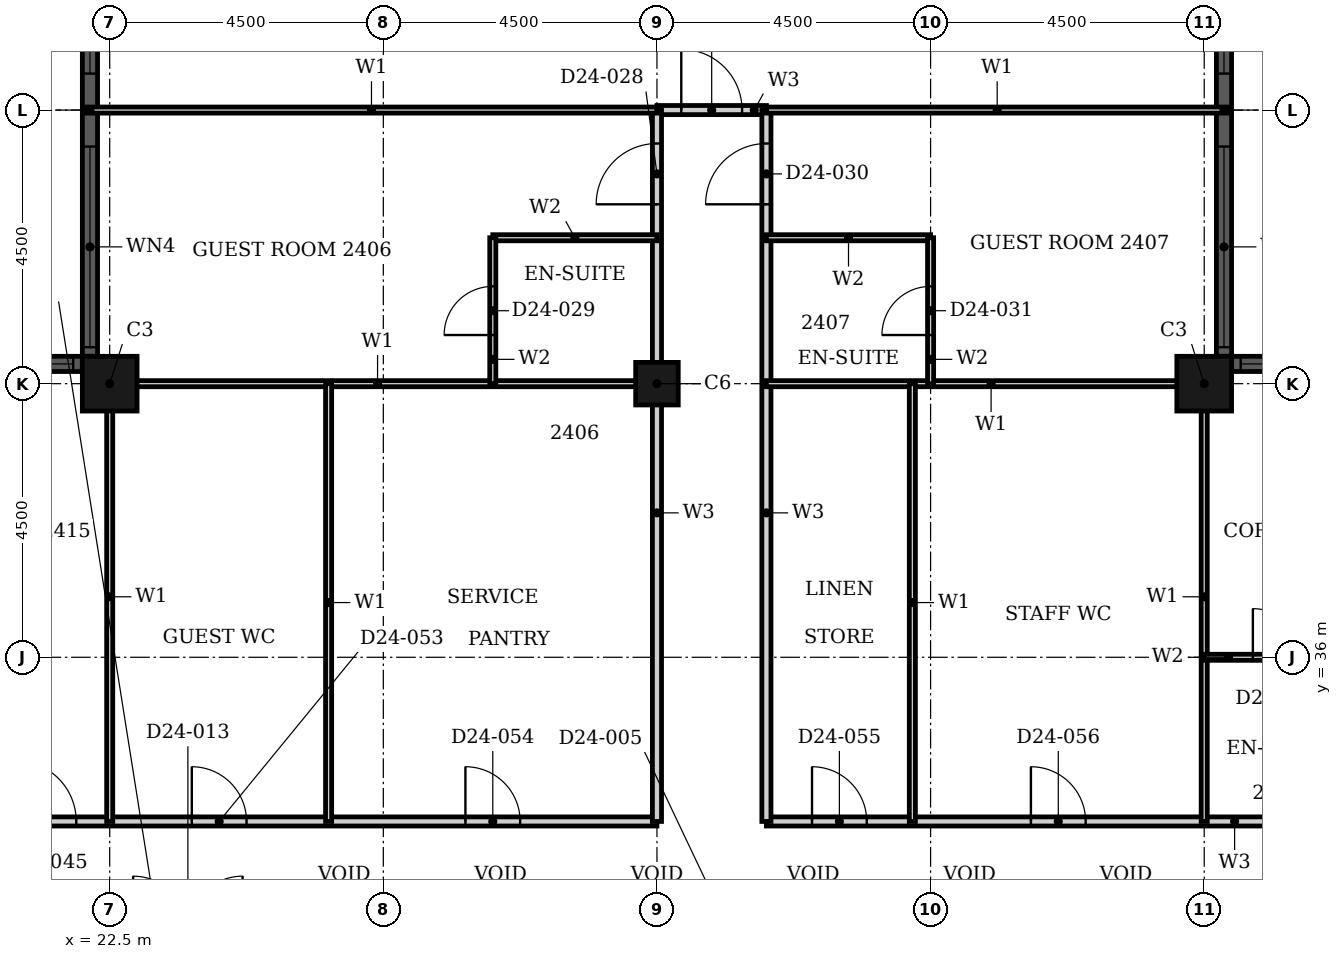
"""IFC4 building model, lengths in metres.
Left out: names, types, materials, properties, quantities, classifications, styles, units other than length and angle.
Written with IfcOpenShell. Run it as: python <this file> out.ifc"""

import sys

from ifc_helpers import new_model, si_unit, direction, frame, frame_2d, origin, origin_2d, place, context, subcontext, project, spatial, rectangle, hollow_rectangle, extrude, element, fill, save


model = new_model("IFC4")
c1 = context("Model", 3, precision=1e-05, world=origin(), true_north=direction((0.0, 1.0)))
c2 = subcontext(c1, "Body", "Model", "MODEL_VIEW")
j1 = project(units=[si_unit("LENGTHUNIT", "METRE"), si_unit("PLANEANGLEUNIT", "RADIAN")], contexts=[c1])
p1 = place(None, origin())
s1 = spatial("IfcSite", under=j1, at=p1, CompositionType="ELEMENT")
p2 = place(p1, origin())
s2 = spatial("IfcBuilding", under=s1, at=p2, CompositionType="ELEMENT")
p3 = place(p2, frame((0.0, 0.0, 100.8)))
s3 = spatial("IfcBuildingStorey", under=s2, at=p3, CompositionType="ELEMENT", Elevation=100.8)
for number, where, z_axis, x_axis in (
    (1, (40.5, 40.5, 0.0), (0.0, 0.0, 1.0), (1.0, 0.0, 0.0)),
    (2, (22.5, 40.5, 0.0), (0.0, 0.0, 1.0), (1.0, 0.0, 0.0)),
):
    element("IfcColumn", number, at=place(p3, frame(where, z_axis=z_axis, x_axis=x_axis)), inside=s3, PredefinedType="COLUMN", context=c2, shape_type="SweptSolid", body=[
        extrude(hollow_rectangle(XDim=0.9, YDim=0.9, WallThickness=0.028, at=origin_2d()), origin(), (0.0, 0.0, 1.0), 3.6),
    ])
p4 = place(p3, frame((31.5, 40.5, 0.0), z_axis=(0.0, 0.0, 1.0), x_axis=(1.0, 0.0, 0.0)))
e3 = element("IfcColumn", 3, at=p4, inside=s3, PredefinedType="COLUMN", context=c2, shape_type="SweptSolid", body=[
    extrude(hollow_rectangle(XDim=0.7, YDim=0.7, WallThickness=0.022, at=origin_2d()), origin(), (0.0, 0.0, 1.0), 3.6),
])
p5 = place(p3, frame((44.55, 40.825, 0.0), z_axis=(0.0, 0.0, 1.0), x_axis=(-1.0, 0.0, 0.0)))
e4 = element("IfcWall", 4, at=p5, inside=s3, PredefinedType="SOLIDWALL", context=c2, shape_type="SweptSolid", body=[
    extrude(rectangle(XDim=3.6, YDim=0.25, at=frame_2d((1.8, 0.0))), origin(), (0.0, 0.0, 1.0), 3.6),
])
p6 = place(p5, frame((0.15, 0.0, 0.9)))
e5 = element("IfcOpeningElement", 5, at=p6, cuts=e4, PredefinedType="OPENING", context=c2, shape_type="SweptSolid", body=[
    extrude(rectangle(XDim=3.3, YDim=2.08, at=frame_2d((1.65, 1.04))), frame((0.0, 0.135, 0.0), z_axis=(0.0, -1.0, 0.0), x_axis=(1.0, 0.0, 0.0)), (0.0, 0.0, 1.0), 0.27),
])
p7 = place(p3, frame((40.825, 40.95, 0.0), z_axis=(0.0, 0.0, 1.0), x_axis=(0.0, 1.0, 0.0)))
e6 = element("IfcWall", 6, at=p7, inside=s3, PredefinedType="SOLIDWALL", context=c2, shape_type="SweptSolid", body=[
    extrude(rectangle(XDim=8.1, YDim=0.25, at=frame_2d((4.05, 0.0))), origin(), (0.0, 0.0, 1.0), 3.6),
])
p8 = place(p7, frame((0.15, 0.0, 0.9)))
e7 = element("IfcOpeningElement", 7, at=p8, cuts=e6, PredefinedType="OPENING", context=c2, shape_type="SweptSolid", body=[
    extrude(rectangle(XDim=3.3, YDim=2.08, at=frame_2d((1.65, 1.04))), frame((0.0, 0.135, 0.0), z_axis=(0.0, -1.0, 0.0), x_axis=(1.0, 0.0, 0.0)), (0.0, 0.0, 1.0), 0.27),
])
p9 = place(p7, frame((4.65, 0.0, 0.9)))
e8 = element("IfcOpeningElement", 8, at=p9, cuts=e6, PredefinedType="OPENING", context=c2, shape_type="SweptSolid", body=[
    extrude(rectangle(XDim=3.3, YDim=2.08, at=frame_2d((1.65, 1.04))), frame((0.0, 0.135, 0.0), z_axis=(0.0, -1.0, 0.0), x_axis=(1.0, 0.0, 0.0)), (0.0, 0.0, 1.0), 0.27),
])
p10 = place(p3, frame((22.175, 49.05, 0.0), z_axis=(0.0, 0.0, 1.0), x_axis=(0.0, -1.0, 0.0)))
e9 = element("IfcWall", 9, at=p10, inside=s3, PredefinedType="SOLIDWALL", context=c2, shape_type="SweptSolid", body=[
    extrude(rectangle(XDim=8.1, YDim=0.25, at=frame_2d((4.05, 0.0))), origin(), (0.0, 0.0, 1.0), 3.6),
])
p11 = place(p10, frame((0.15, 0.0, 0.9)))
e10 = element("IfcOpeningElement", 10, at=p11, cuts=e9, PredefinedType="OPENING", context=c2, shape_type="SweptSolid", body=[
    extrude(rectangle(XDim=3.3, YDim=2.08, at=frame_2d((1.65, 1.04))), frame((0.0, 0.135, 0.0), z_axis=(0.0, -1.0, 0.0), x_axis=(1.0, 0.0, 0.0)), (0.0, 0.0, 1.0), 0.27),
])
p12 = place(p10, frame((4.65, 0.0, 0.9)))
e11 = element("IfcOpeningElement", 11, at=p12, cuts=e9, PredefinedType="OPENING", context=c2, shape_type="SweptSolid", body=[
    extrude(rectangle(XDim=3.3, YDim=2.08, at=frame_2d((1.65, 1.04))), frame((0.0, 0.135, 0.0), z_axis=(0.0, -1.0, 0.0), x_axis=(1.0, 0.0, 0.0)), (0.0, 0.0, 1.0), 0.27),
])
p13 = place(p3, frame((22.05, 40.825, 0.0), z_axis=(0.0, 0.0, 1.0), x_axis=(-1.0, 0.0, 0.0)))
e12 = element("IfcWall", 12, at=p13, inside=s3, PredefinedType="SOLIDWALL", context=c2, shape_type="SweptSolid", body=[
    extrude(rectangle(XDim=3.6, YDim=0.25, at=frame_2d((1.8, 0.0))), origin(), (0.0, 0.0, 1.0), 3.6),
])
p14 = place(p13, frame((0.15, 0.0, 0.9)))
e13 = element("IfcOpeningElement", 13, at=p14, cuts=e12, PredefinedType="OPENING", context=c2, shape_type="SweptSolid", body=[
    extrude(rectangle(XDim=3.3, YDim=2.08, at=frame_2d((1.65, 1.04))), frame((0.0, 0.135, 0.0), z_axis=(0.0, -1.0, 0.0), x_axis=(1.0, 0.0, 0.0)), (0.0, 0.0, 1.0), 0.27),
])
p15 = place(p3, frame((16.2, 33.3, 0.0), z_axis=(0.0, 0.0, 1.0), x_axis=(1.0, 0.0, 0.0)))
e14 = element("IfcWall", 14, at=p15, inside=s3, PredefinedType="PARTITIONING", context=c2, shape_type="SweptSolid", body=[
    extrude(rectangle(XDim=15.3, YDim=0.15, at=frame_2d((7.65, 0.0))), origin(), (0.0, 0.0, 1.0), 3.3),
])
p16 = place(p15, frame((4.75, 0.0, 0.0)))
e15 = element("IfcOpeningElement", 15, at=p16, cuts=e14, PredefinedType="OPENING", context=c2, shape_type="SweptSolid", body=[
    extrude(rectangle(XDim=1.0, YDim=2.1, at=frame_2d((0.5, 1.05))), frame((0.0, 0.085, 0.0), z_axis=(0.0, -1.0, 0.0), x_axis=(1.0, 0.0, 0.0)), (0.0, 0.0, 1.0), 0.17),
])
p17 = place(p15, frame((7.65, 0.0, 0.0)))
e16 = element("IfcOpeningElement", 16, at=p17, cuts=e14, PredefinedType="OPENING", context=c2, shape_type="SweptSolid", body=[
    extrude(rectangle(XDim=0.9, YDim=2.1, at=frame_2d((0.45, 1.05))), frame((0.0, 0.085, 0.0), z_axis=(0.0, -1.0, 0.0), x_axis=(1.0, 0.0, 0.0)), (0.0, 0.0, 1.0), 0.17),
])
p18 = place(p15, frame((12.15, 0.0, 0.0)))
e17 = element("IfcOpeningElement", 17, at=p18, cuts=e14, PredefinedType="OPENING", context=c2, shape_type="SweptSolid", body=[
    extrude(rectangle(XDim=0.9, YDim=2.1, at=frame_2d((0.45, 1.05))), frame((0.0, 0.085, 0.0), z_axis=(0.0, -1.0, 0.0), x_axis=(1.0, 0.0, 0.0)), (0.0, 0.0, 1.0), 0.17),
])
p19 = place(p3, frame((33.3, 33.3, 0.0), z_axis=(0.0, 0.0, 1.0), x_axis=(1.0, 0.0, 0.0)))
e18 = element("IfcWall", 18, at=p19, inside=s3, PredefinedType="PARTITIONING", context=c2, shape_type="SweptSolid", body=[
    extrude(rectangle(XDim=13.5, YDim=0.15, at=frame_2d((6.75, 0.0))), origin(), (0.0, 0.0, 1.0), 3.3),
])
p20 = place(p19, frame((10.15, 0.0, 0.0)))
e19 = element("IfcOpeningElement", 19, at=p20, cuts=e18, PredefinedType="OPENING", context=c2, shape_type="SweptSolid", body=[
    extrude(rectangle(XDim=1.0, YDim=2.1, at=frame_2d((0.5, 1.05))), frame((0.0, 0.085, 0.0), z_axis=(0.0, -1.0, 0.0), x_axis=(1.0, 0.0, 0.0)), (0.0, 0.0, 1.0), 0.17),
])
p21 = place(p19, frame((0.75, 0.0, 0.0)))
e20 = element("IfcOpeningElement", 20, at=p21, cuts=e18, PredefinedType="OPENING", context=c2, shape_type="SweptSolid", body=[
    extrude(rectangle(XDim=0.9, YDim=2.1, at=frame_2d((0.45, 1.05))), frame((0.0, 0.085, 0.0), z_axis=(0.0, -1.0, 0.0), x_axis=(1.0, 0.0, 0.0)), (0.0, 0.0, 1.0), 0.17),
])
p22 = place(p19, frame((4.35, 0.0, 0.0)))
e21 = element("IfcOpeningElement", 21, at=p22, cuts=e18, PredefinedType="OPENING", context=c2, shape_type="SweptSolid", body=[
    extrude(rectangle(XDim=0.9, YDim=2.1, at=frame_2d((0.45, 1.05))), frame((0.0, 0.085, 0.0), z_axis=(0.0, -1.0, 0.0), x_axis=(1.0, 0.0, 0.0)), (0.0, 0.0, 1.0), 0.17),
])
p23 = place(p3, frame((31.5, 45.0, 0.0), z_axis=(0.0, 0.0, 1.0), x_axis=(1.0, 0.0, 0.0)))
e22 = element("IfcWall", 22, at=p23, inside=s3, PredefinedType="PARTITIONING", context=c2, shape_type="SweptSolid", body=[
    extrude(rectangle(XDim=1.8, YDim=0.15, at=frame_2d((0.9, 0.0))), origin(), (0.0, 0.0, 1.0), 3.3),
])
p24 = place(p23, frame((0.4, 0.0, 0.0)))
e23 = element("IfcOpeningElement", 23, at=p24, cuts=e22, PredefinedType="OPENING", context=c2, shape_type="SweptSolid", body=[
    extrude(rectangle(XDim=1.0, YDim=2.1, at=frame_2d((0.5, 1.05))), frame((0.0, 0.085, 0.0), z_axis=(0.0, -1.0, 0.0), x_axis=(1.0, 0.0, 0.0)), (0.0, 0.0, 1.0), 0.17),
])
p25 = place(p3, frame((31.5, 33.3, 0.0), z_axis=(0.0, 0.0, 1.0), x_axis=(0.0, 1.0, 0.0)))
e24 = element("IfcWall", 24, at=p25, inside=s3, PredefinedType="PARTITIONING", context=c2, shape_type="SweptSolid", body=[
    extrude(rectangle(XDim=11.7, YDim=0.15, at=frame_2d((5.85, 0.0))), origin(), (0.0, 0.0, 1.0), 2.58),
])
p26 = place(p25, frame((10.15, 0.0, 0.0)))
e25 = element("IfcOpeningElement", 25, at=p26, cuts=e24, PredefinedType="OPENING", context=c2, shape_type="SweptSolid", body=[
    extrude(rectangle(XDim=1.0, YDim=2.1, at=frame_2d((0.5, 1.05))), frame((0.0, 0.085, 0.0), z_axis=(0.0, -1.0, 0.0), x_axis=(1.0, 0.0, 0.0)), (0.0, 0.0, 1.0), 0.17),
])
p27 = place(p3, frame((33.3, 33.3, 0.0), z_axis=(0.0, 0.0, 1.0), x_axis=(0.0, 1.0, 0.0)))
e26 = element("IfcWall", 26, at=p27, inside=s3, PredefinedType="PARTITIONING", context=c2, shape_type="SweptSolid", body=[
    extrude(rectangle(XDim=11.7, YDim=0.15, at=frame_2d((5.85, 0.0))), origin(), (0.0, 0.0, 1.0), 3.3),
])
p28 = place(p27, frame((10.15, 0.0, 0.0)))
e27 = element("IfcOpeningElement", 27, at=p28, cuts=e26, PredefinedType="OPENING", context=c2, shape_type="SweptSolid", body=[
    extrude(rectangle(XDim=1.0, YDim=2.1, at=frame_2d((0.5, 1.05))), frame((0.0, 0.085, 0.0), z_axis=(0.0, -1.0, 0.0), x_axis=(1.0, 0.0, 0.0)), (0.0, 0.0, 1.0), 0.17),
])
p29 = place(p3, frame((33.3, 40.5, 0.0), z_axis=(0.0, 0.0, 1.0), x_axis=(1.0, 0.0, 0.0)))
e28 = element("IfcWall", 28, at=p29, inside=s3, PredefinedType="PARTITIONING", context=c2, shape_type="SweptSolid", body=[
    extrude(rectangle(XDim=7.39, YDim=0.1, at=frame_2d((3.695, 0.0))), origin(), (0.0, 0.0, 1.0), 2.38),
])
p30 = place(p3, frame((22.31, 40.5, 0.0), z_axis=(0.0, 0.0, 1.0), x_axis=(1.0, 0.0, 0.0)))
e29 = element("IfcWall", 29, at=p30, inside=s3, PredefinedType="PARTITIONING", context=c2, shape_type="SweptSolid", body=[
    extrude(rectangle(XDim=9.19, YDim=0.1, at=frame_2d((4.595, 0.0))), origin(), (0.0, 0.0, 1.0), 2.38),
])
p31 = place(p3, frame((33.3, 45.0, 0.0), z_axis=(0.0, 0.0, 1.0), x_axis=(1.0, 0.0, 0.0)))
e30 = element("IfcWall", 30, at=p31, inside=s3, PredefinedType="PARTITIONING", context=c2, shape_type="SweptSolid", body=[
    extrude(rectangle(XDim=7.59, YDim=0.1, at=frame_2d((3.795, 0.0))), origin(), (0.0, 0.0, 1.0), 3.3),
])
p32 = place(p3, frame((22.11, 45.0, 0.0), z_axis=(0.0, 0.0, 1.0), x_axis=(1.0, 0.0, 0.0)))
e31 = element("IfcWall", 31, at=p32, inside=s3, PredefinedType="PARTITIONING", context=c2, shape_type="SweptSolid", body=[
    extrude(rectangle(XDim=9.39, YDim=0.1, at=frame_2d((4.695, 0.0))), origin(), (0.0, 0.0, 1.0), 3.3),
])
p33 = place(p3, frame((22.5, 33.3, 0.0), z_axis=(0.0, 0.0, 1.0), x_axis=(0.0, 1.0, 0.0)))
e32 = element("IfcWall", 32, at=p33, inside=s3, PredefinedType="PARTITIONING", context=c2, shape_type="SweptSolid", body=[
    extrude(rectangle(XDim=7.39, YDim=0.1, at=frame_2d((3.695, 0.0))), origin(), (0.0, 0.0, 1.0), 3.3),
])
for number, where, z_axis, x_axis in (
    (33, (26.1, 33.3, 0.0), (0.0, 0.0, 1.0), (0.0, 1.0, 0.0)),
    (34, (35.7, 33.3, 0.0), (0.0, 0.0, 1.0), (0.0, 1.0, 0.0)),
):
    element("IfcWall", number, at=place(p3, frame(where, z_axis=z_axis, x_axis=x_axis)), inside=s3, PredefinedType="PARTITIONING", context=c2, shape_type="SweptSolid", body=[
        extrude(rectangle(XDim=7.2, YDim=0.1, at=frame_2d((3.6, 0.0))), origin(), (0.0, 0.0, 1.0), 3.3),
    ])
p34 = place(p3, frame((40.5, 33.3, 0.0), z_axis=(0.0, 0.0, 1.0), x_axis=(0.0, 1.0, 0.0)))
e35 = element("IfcWall", 35, at=p34, inside=s3, PredefinedType="PARTITIONING", context=c2, shape_type="SweptSolid", body=[
    extrude(rectangle(XDim=7.39, YDim=0.1, at=frame_2d((3.695, 0.0))), origin(), (0.0, 0.0, 1.0), 3.3),
])
p35 = place(p3, frame((40.5, 36.0, 0.0), z_axis=(0.0, 0.0, 1.0), x_axis=(1.0, 0.0, 0.0)))
e36 = element("IfcWall", 36, at=p35, inside=s3, PredefinedType="PARTITIONING", context=c2, shape_type="SweptSolid", body=[
    extrude(rectangle(XDim=2.4, YDim=0.1, at=frame_2d((1.2, 0.0))), origin(), (0.0, 0.0, 1.0), 3.3),
])
p36 = place(p35, frame((0.8, 0.0, 0.0)))
e37 = element("IfcOpeningElement", 37, at=p36, cuts=e36, PredefinedType="OPENING", context=c2, shape_type="SweptSolid", body=[
    extrude(rectangle(XDim=0.8, YDim=2.1, at=frame_2d((0.4, 1.05))), frame((0.0, 0.06, 0.0), z_axis=(0.0, -1.0, 0.0), x_axis=(1.0, 0.0, 0.0)), (0.0, 0.0, 1.0), 0.12),
])
for number, where, z_axis, x_axis in (
    (38, (33.3, 42.9, 0.0), (0.0, 0.0, 1.0), (1.0, 0.0, 0.0)),
    (39, (28.8, 42.9, 0.0), (0.0, 0.0, 1.0), (1.0, 0.0, 0.0)),
):
    element("IfcWall", number, at=place(p3, frame(where, z_axis=z_axis, x_axis=x_axis)), inside=s3, PredefinedType="PARTITIONING", context=c2, shape_type="SweptSolid", body=[
        extrude(rectangle(XDim=2.7, YDim=0.1, at=frame_2d((1.35, 0.0))), origin(), (0.0, 0.0, 1.0), 3.3),
    ])
p37 = place(p3, frame((28.8, 40.5, 0.0), z_axis=(0.0, 0.0, 1.0), x_axis=(0.0, 1.0, 0.0)))
e40 = element("IfcWall", 40, at=p37, inside=s3, PredefinedType="PARTITIONING", context=c2, shape_type="SweptSolid", body=[
    extrude(rectangle(XDim=2.4, YDim=0.1, at=frame_2d((1.2, 0.0))), origin(), (0.0, 0.0, 1.0), 3.3),
])
p38 = place(p37, frame((0.8, 0.0, 0.0)))
e41 = element("IfcOpeningElement", 41, at=p38, cuts=e40, PredefinedType="OPENING", context=c2, shape_type="SweptSolid", body=[
    extrude(rectangle(XDim=0.8, YDim=2.1, at=frame_2d((0.4, 1.05))), frame((0.0, 0.06, 0.0), z_axis=(0.0, -1.0, 0.0), x_axis=(1.0, 0.0, 0.0)), (0.0, 0.0, 1.0), 0.12),
])
p39 = place(p3, frame((36.0, 40.5, 0.0), z_axis=(0.0, 0.0, 1.0), x_axis=(0.0, 1.0, 0.0)))
e42 = element("IfcWall", 42, at=p39, inside=s3, PredefinedType="PARTITIONING", context=c2, shape_type="SweptSolid", body=[
    extrude(rectangle(XDim=2.4, YDim=0.1, at=frame_2d((1.2, 0.0))), origin(), (0.0, 0.0, 1.0), 2.58),
])
p40 = place(p39, frame((0.8, 0.0, 0.0)))
e43 = element("IfcOpeningElement", 43, at=p40, cuts=e42, PredefinedType="OPENING", context=c2, shape_type="SweptSolid", body=[
    extrude(rectangle(XDim=0.8, YDim=2.1, at=frame_2d((0.4, 1.05))), frame((0.0, 0.06, 0.0), z_axis=(0.0, -1.0, 0.0), x_axis=(1.0, 0.0, 0.0)), (0.0, 0.0, 1.0), 0.12),
])
p41 = place(p6, origin())
e44 = element("IfcWindow", 44, at=p41, inside=s3, PartitioningType="SINGLE_PANEL", PredefinedType="WINDOW", context=c2, shape_type="SweptSolid", body=[
    extrude(rectangle(XDim=3.3, YDim=2.08, at=frame_2d((1.65, 1.04))), frame((0.0, 0.03, 0.0), z_axis=(0.0, -1.0, 0.0), x_axis=(1.0, 0.0, 0.0)), (0.0, 0.0, 1.0), 0.06),
])
fill(e5, e44)
p42 = place(p8, origin())
e45 = element("IfcWindow", 45, at=p42, inside=s3, PartitioningType="SINGLE_PANEL", PredefinedType="WINDOW", context=c2, shape_type="SweptSolid", body=[
    extrude(rectangle(XDim=3.3, YDim=2.08, at=frame_2d((1.65, 1.04))), frame((0.0, 0.03, 0.0), z_axis=(0.0, -1.0, 0.0), x_axis=(1.0, 0.0, 0.0)), (0.0, 0.0, 1.0), 0.06),
])
fill(e7, e45)
p43 = place(p9, origin())
e46 = element("IfcWindow", 46, at=p43, inside=s3, PartitioningType="SINGLE_PANEL", PredefinedType="WINDOW", context=c2, shape_type="SweptSolid", body=[
    extrude(rectangle(XDim=3.3, YDim=2.08, at=frame_2d((1.65, 1.04))), frame((0.0, 0.03, 0.0), z_axis=(0.0, -1.0, 0.0), x_axis=(1.0, 0.0, 0.0)), (0.0, 0.0, 1.0), 0.06),
])
fill(e8, e46)
p44 = place(p11, origin())
e47 = element("IfcWindow", 47, at=p44, inside=s3, PartitioningType="SINGLE_PANEL", PredefinedType="WINDOW", context=c2, shape_type="SweptSolid", body=[
    extrude(rectangle(XDim=3.3, YDim=2.08, at=frame_2d((1.65, 1.04))), frame((0.0, 0.03, 0.0), z_axis=(0.0, -1.0, 0.0), x_axis=(1.0, 0.0, 0.0)), (0.0, 0.0, 1.0), 0.06),
])
fill(e10, e47)
p45 = place(p12, origin())
e48 = element("IfcWindow", 48, at=p45, inside=s3, PartitioningType="SINGLE_PANEL", PredefinedType="WINDOW", context=c2, shape_type="SweptSolid", body=[
    extrude(rectangle(XDim=3.3, YDim=2.08, at=frame_2d((1.65, 1.04))), frame((0.0, 0.03, 0.0), z_axis=(0.0, -1.0, 0.0), x_axis=(1.0, 0.0, 0.0)), (0.0, 0.0, 1.0), 0.06),
])
fill(e11, e48)
p46 = place(p14, origin())
e49 = element("IfcWindow", 49, at=p46, inside=s3, PartitioningType="SINGLE_PANEL", PredefinedType="WINDOW", context=c2, shape_type="SweptSolid", body=[
    extrude(rectangle(XDim=3.3, YDim=2.08, at=frame_2d((1.65, 1.04))), frame((0.0, 0.03, 0.0), z_axis=(0.0, -1.0, 0.0), x_axis=(1.0, 0.0, 0.0)), (0.0, 0.0, 1.0), 0.06),
])
fill(e13, e49)
p47 = place(p26, origin())
e50 = element("IfcDoor", 50, at=p47, inside=s3, OperationType="SINGLE_SWING_RIGHT", PredefinedType="DOOR", context=c2, shape_type="SweptSolid", body=[
    extrude(rectangle(XDim=1.0, YDim=2.1, at=frame_2d((0.5, 1.05))), frame((0.0, 0.025, 0.0), z_axis=(0.0, -1.0, 0.0), x_axis=(1.0, 0.0, 0.0)), (0.0, 0.0, 1.0), 0.05),
])
fill(e25, e50)
p48 = place(p38, origin())
e51 = element("IfcDoor", 51, at=p48, inside=s3, OperationType="SINGLE_SWING_LEFT", PredefinedType="DOOR", context=c2, shape_type="SweptSolid", body=[
    extrude(rectangle(XDim=0.8, YDim=2.1, at=frame_2d((0.4, 1.05))), frame((0.0, 0.025, 0.0), z_axis=(0.0, -1.0, 0.0), x_axis=(1.0, 0.0, 0.0)), (0.0, 0.0, 1.0), 0.05),
])
fill(e41, e51)
p49 = place(p28, origin())
e52 = element("IfcDoor", 52, at=p49, inside=s3, OperationType="SINGLE_SWING_RIGHT", PredefinedType="DOOR", context=c2, shape_type="SweptSolid", body=[
    extrude(rectangle(XDim=1.0, YDim=2.1, at=frame_2d((0.5, 1.05))), frame((0.0, 0.025, 0.0), z_axis=(0.0, -1.0, 0.0), x_axis=(1.0, 0.0, 0.0)), (0.0, 0.0, 1.0), 0.05),
])
fill(e27, e52)
p50 = place(p40, origin())
e53 = element("IfcDoor", 53, at=p50, inside=s3, OperationType="SINGLE_SWING_RIGHT", PredefinedType="DOOR", context=c2, shape_type="SweptSolid", body=[
    extrude(rectangle(XDim=0.8, YDim=2.1, at=frame_2d((0.4, 1.05))), frame((0.0, 0.025, 0.0), z_axis=(0.0, -1.0, 0.0), x_axis=(1.0, 0.0, 0.0)), (0.0, 0.0, 1.0), 0.05),
])
fill(e43, e53)
p51 = place(p24, origin())
e54 = element("IfcDoor", 54, at=p51, inside=s3, OperationType="SINGLE_SWING_LEFT", PredefinedType="DOOR", context=c2, shape_type="SweptSolid", body=[
    extrude(rectangle(XDim=1.0, YDim=2.1, at=frame_2d((0.5, 1.05))), frame((0.0, 0.025, 0.0), z_axis=(0.0, -1.0, 0.0), x_axis=(1.0, 0.0, 0.0)), (0.0, 0.0, 1.0), 0.05),
])
fill(e23, e54)
p52 = place(p16, origin())
e55 = element("IfcDoor", 55, at=p52, inside=s3, OperationType="SINGLE_SWING_RIGHT", PredefinedType="DOOR", context=c2, shape_type="SweptSolid", body=[
    extrude(rectangle(XDim=1.0, YDim=2.1, at=frame_2d((0.5, 1.05))), frame((0.0, 0.025, 0.0), z_axis=(0.0, -1.0, 0.0), x_axis=(1.0, 0.0, 0.0)), (0.0, 0.0, 1.0), 0.05),
])
fill(e15, e55)
p53 = place(p36, origin())
e56 = element("IfcDoor", 56, at=p53, inside=s3, OperationType="SINGLE_SWING_LEFT", PredefinedType="DOOR", context=c2, shape_type="SweptSolid", body=[
    extrude(rectangle(XDim=0.8, YDim=2.1, at=frame_2d((0.4, 1.05))), frame((0.0, 0.025, 0.0), z_axis=(0.0, -1.0, 0.0), x_axis=(1.0, 0.0, 0.0)), (0.0, 0.0, 1.0), 0.05),
])
fill(e37, e56)
p54 = place(p17, origin())
e57 = element("IfcDoor", 57, at=p54, inside=s3, OperationType="SINGLE_SWING_LEFT", PredefinedType="DOOR", context=c2, shape_type="SweptSolid", body=[
    extrude(rectangle(XDim=0.9, YDim=2.1, at=frame_2d((0.45, 1.05))), frame((0.0, 0.025, 0.0), z_axis=(0.0, -1.0, 0.0), x_axis=(1.0, 0.0, 0.0)), (0.0, 0.0, 1.0), 0.05),
])
fill(e16, e57)
p55 = place(p18, origin())
e58 = element("IfcDoor", 58, at=p55, inside=s3, OperationType="SINGLE_SWING_RIGHT", PredefinedType="DOOR", context=c2, shape_type="SweptSolid", body=[
    extrude(rectangle(XDim=0.9, YDim=2.1, at=frame_2d((0.45, 1.05))), frame((0.0, 0.025, 0.0), z_axis=(0.0, -1.0, 0.0), x_axis=(1.0, 0.0, 0.0)), (0.0, 0.0, 1.0), 0.05),
])
fill(e17, e58)
p56 = place(p21, origin())
e59 = element("IfcDoor", 59, at=p56, inside=s3, OperationType="SINGLE_SWING_RIGHT", PredefinedType="DOOR", context=c2, shape_type="SweptSolid", body=[
    extrude(rectangle(XDim=0.9, YDim=2.1, at=frame_2d((0.45, 1.05))), frame((0.0, 0.025, 0.0), z_axis=(0.0, -1.0, 0.0), x_axis=(1.0, 0.0, 0.0)), (0.0, 0.0, 1.0), 0.05),
])
fill(e20, e59)
p57 = place(p22, origin())
e60 = element("IfcDoor", 60, at=p57, inside=s3, OperationType="SINGLE_SWING_LEFT", PredefinedType="DOOR", context=c2, shape_type="SweptSolid", body=[
    extrude(rectangle(XDim=0.9, YDim=2.1, at=frame_2d((0.45, 1.05))), frame((0.0, 0.025, 0.0), z_axis=(0.0, -1.0, 0.0), x_axis=(1.0, 0.0, 0.0)), (0.0, 0.0, 1.0), 0.05),
])
fill(e21, e60)
save(model, sys.argv[1])
